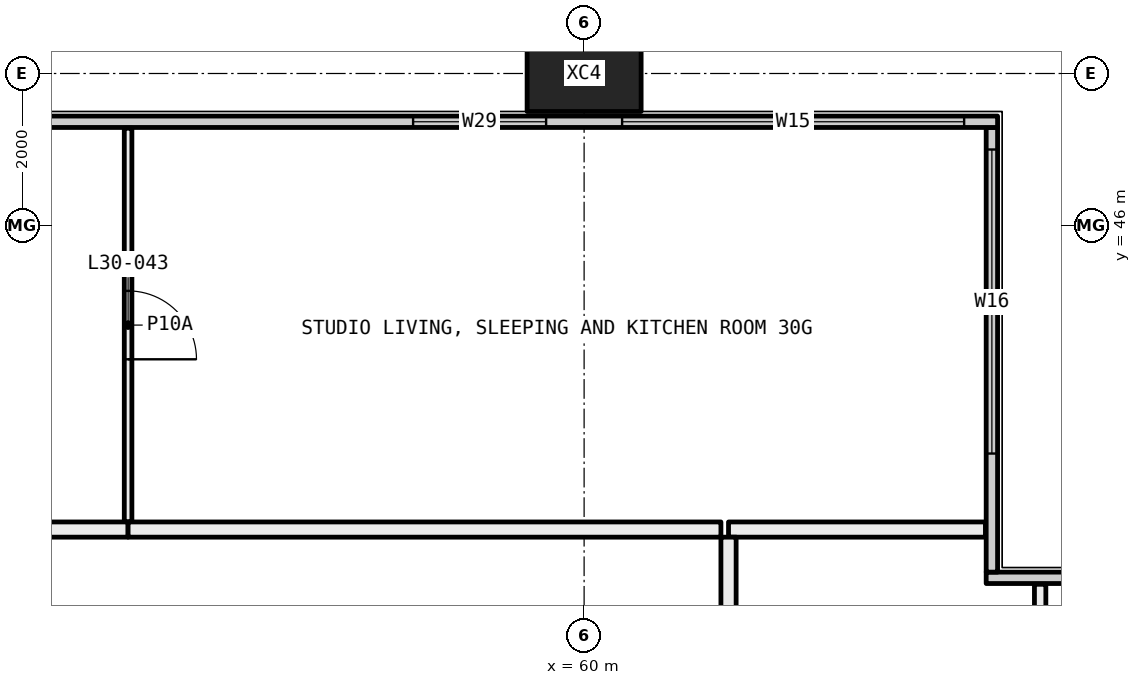
"""IFC4 building model, lengths in metres.
Left out: names, types, materials, properties, quantities, classifications, styles, units other than length and angle.
Written with IfcOpenShell. Run it as: python <this file> out.ifc"""

import sys

from ifc_helpers import new_model, si_unit, direction, frame, frame_2d, origin, origin_2d, place, context, subcontext, project, spatial, rectangle, hollow_rectangle, extrude, element, fill, save


model = new_model("IFC4")
c1 = context("Model", 3, precision=1e-05, world=origin(), true_north=direction((0.0, 1.0)))
c2 = subcontext(c1, "Body", "Model", "MODEL_VIEW")
j1 = project(units=[si_unit("LENGTHUNIT", "METRE"), si_unit("PLANEANGLEUNIT", "RADIAN")], contexts=[c1])
p1 = place(None, origin())
s1 = spatial("IfcSite", under=j1, at=p1, CompositionType="ELEMENT")
p2 = place(p1, origin())
s2 = spatial("IfcBuilding", under=s1, at=p2, CompositionType="ELEMENT")
p3 = place(p2, frame((0.0, 0.0, 117.3)))
s3 = spatial("IfcBuildingStorey", under=s2, at=p3, CompositionType="ELEMENT", Elevation=117.3)
p4 = place(p3, frame((60.0, 48.0, -0.4), z_axis=(0.0, 0.0, 1.0), x_axis=(1.0, 0.0, 0.0)))
e1 = element("IfcColumn", 1, at=p4, inside=s3, PredefinedType="COLUMN", context=c2, shape_type="SweptSolid", body=[
    extrude(hollow_rectangle(XDim=1.5, YDim=1.0, WallThickness=0.06, at=origin_2d()), origin(), (0.0, 0.0, 1.0), 3.45),
])
p5 = place(p3, frame((65.29, 41.365, 0.0), z_axis=(0.0, 0.0, 1.0), x_axis=(1.0, 0.0, 0.0)))
e2 = element("IfcWall", 2, at=p5, inside=s3, PredefinedType="ELEMENTEDWALL", context=c2, shape_type="SweptSolid", body=[
    extrude(rectangle(XDim=6.15, YDim=0.15, at=frame_2d((3.075, 0.0))), origin(), (0.0, 0.0, 1.0), 3.05),
])
p6 = place(p5, frame((1.71, 0.0, 0.45)))
e3 = element("IfcOpeningElement", 3, at=p6, cuts=e2, PredefinedType="OPENING", context=c2, shape_type="SweptSolid", body=[
    extrude(rectangle(XDim=4.0, YDim=2.55, at=frame_2d((2.0, 1.275))), frame((0.0, 0.085, 0.0), z_axis=(0.0, -1.0, 0.0), x_axis=(1.0, 0.0, 0.0)), (0.0, 0.0, 1.0), 0.17),
])
p7 = place(p3, frame((65.365, 41.44, 0.0), z_axis=(0.0, 0.0, 1.0), x_axis=(0.0, 1.0, 0.0)))
e4 = element("IfcWall", 4, at=p7, inside=s3, PredefinedType="ELEMENTEDWALL", context=c2, shape_type="SweptSolid", body=[
    extrude(rectangle(XDim=5.85, YDim=0.15, at=frame_2d((2.925, 0.0))), origin(), (0.0, 0.0, 1.0), 3.05),
])
p8 = place(p7, frame((1.56, 0.0, 0.45)))
e5 = element("IfcOpeningElement", 5, at=p8, cuts=e4, PredefinedType="OPENING", context=c2, shape_type="SweptSolid", body=[
    extrude(rectangle(XDim=4.0, YDim=2.55, at=frame_2d((2.0, 1.275))), frame((0.0, 0.085, 0.0), z_axis=(0.0, -1.0, 0.0), x_axis=(1.0, 0.0, 0.0)), (0.0, 0.0, 1.0), 0.17),
])
p9 = place(p3, frame((6.56, 47.365, 0.0), z_axis=(0.0, 0.0, 1.0), x_axis=(1.0, 0.0, 0.0)))
e6 = element("IfcWall", 6, at=p9, inside=s3, PredefinedType="ELEMENTEDWALL", context=c2, shape_type="SweptSolid", body=[
    extrude(rectangle(XDim=58.88, YDim=0.15, at=frame_2d((29.44, 0.0))), origin(), (0.0, 0.0, 1.0), 3.05),
])
p10 = place(p9, frame((0.44, 0.0, 0.45)))
e7 = element("IfcOpeningElement", 7, at=p10, cuts=e6, PredefinedType="OPENING", context=c2, shape_type="SweptSolid", body=[
    extrude(rectangle(XDim=4.5, YDim=2.55, at=frame_2d((2.25, 1.275))), frame((0.0, 0.085, 0.0), z_axis=(0.0, -1.0, 0.0), x_axis=(1.0, 0.0, 0.0)), (0.0, 0.0, 1.0), 0.17),
])
p11 = place(p9, frame((5.94, 0.0, 0.45)))
e8 = element("IfcOpeningElement", 8, at=p11, cuts=e6, PredefinedType="OPENING", context=c2, shape_type="SweptSolid", body=[
    extrude(rectangle(XDim=1.75, YDim=2.55, at=frame_2d((0.875, 1.275))), frame((0.0, 0.085, 0.0), z_axis=(0.0, -1.0, 0.0), x_axis=(1.0, 0.0, 0.0)), (0.0, 0.0, 1.0), 0.17),
])
p12 = place(p9, frame((15.19, 0.0, 0.45)))
e9 = element("IfcOpeningElement", 9, at=p12, cuts=e6, PredefinedType="OPENING", context=c2, shape_type="SweptSolid", body=[
    extrude(rectangle(XDim=1.75, YDim=2.55, at=frame_2d((0.875, 1.275))), frame((0.0, 0.085, 0.0), z_axis=(0.0, -1.0, 0.0), x_axis=(1.0, 0.0, 0.0)), (0.0, 0.0, 1.0), 0.17),
])
p13 = place(p9, frame((17.94, 0.0, 0.45)))
e10 = element("IfcOpeningElement", 10, at=p13, cuts=e6, PredefinedType="OPENING", context=c2, shape_type="SweptSolid", body=[
    extrude(rectangle(XDim=1.75, YDim=2.55, at=frame_2d((0.875, 1.275))), frame((0.0, 0.085, 0.0), z_axis=(0.0, -1.0, 0.0), x_axis=(1.0, 0.0, 0.0)), (0.0, 0.0, 1.0), 0.17),
])
p14 = place(p9, frame((27.19, 0.0, 0.45)))
e11 = element("IfcOpeningElement", 11, at=p14, cuts=e6, PredefinedType="OPENING", context=c2, shape_type="SweptSolid", body=[
    extrude(rectangle(XDim=1.75, YDim=2.55, at=frame_2d((0.875, 1.275))), frame((0.0, 0.085, 0.0), z_axis=(0.0, -1.0, 0.0), x_axis=(1.0, 0.0, 0.0)), (0.0, 0.0, 1.0), 0.17),
])
p15 = place(p9, frame((29.94, 0.0, 0.45)))
e12 = element("IfcOpeningElement", 12, at=p15, cuts=e6, PredefinedType="OPENING", context=c2, shape_type="SweptSolid", body=[
    extrude(rectangle(XDim=1.75, YDim=2.55, at=frame_2d((0.875, 1.275))), frame((0.0, 0.085, 0.0), z_axis=(0.0, -1.0, 0.0), x_axis=(1.0, 0.0, 0.0)), (0.0, 0.0, 1.0), 0.17),
])
p16 = place(p9, frame((39.19, 0.0, 0.45)))
e13 = element("IfcOpeningElement", 13, at=p16, cuts=e6, PredefinedType="OPENING", context=c2, shape_type="SweptSolid", body=[
    extrude(rectangle(XDim=1.75, YDim=2.55, at=frame_2d((0.875, 1.275))), frame((0.0, 0.085, 0.0), z_axis=(0.0, -1.0, 0.0), x_axis=(1.0, 0.0, 0.0)), (0.0, 0.0, 1.0), 0.17),
])
p17 = place(p9, frame((41.94, 0.0, 0.45)))
e14 = element("IfcOpeningElement", 14, at=p17, cuts=e6, PredefinedType="OPENING", context=c2, shape_type="SweptSolid", body=[
    extrude(rectangle(XDim=1.75, YDim=2.55, at=frame_2d((0.875, 1.275))), frame((0.0, 0.085, 0.0), z_axis=(0.0, -1.0, 0.0), x_axis=(1.0, 0.0, 0.0)), (0.0, 0.0, 1.0), 0.17),
])
p18 = place(p9, frame((51.19, 0.0, 0.45)))
e15 = element("IfcOpeningElement", 15, at=p18, cuts=e6, PredefinedType="OPENING", context=c2, shape_type="SweptSolid", body=[
    extrude(rectangle(XDim=1.75, YDim=2.55, at=frame_2d((0.875, 1.275))), frame((0.0, 0.085, 0.0), z_axis=(0.0, -1.0, 0.0), x_axis=(1.0, 0.0, 0.0)), (0.0, 0.0, 1.0), 0.17),
])
p19 = place(p9, frame((53.94, 0.0, 0.45)))
e16 = element("IfcOpeningElement", 16, at=p19, cuts=e6, PredefinedType="OPENING", context=c2, shape_type="SweptSolid", body=[
    extrude(rectangle(XDim=4.5, YDim=2.55, at=frame_2d((2.25, 1.275))), frame((0.0, 0.085, 0.0), z_axis=(0.0, -1.0, 0.0), x_axis=(1.0, 0.0, 0.0)), (0.0, 0.0, 1.0), 0.17),
])
p20 = place(p3, frame((66.0, 41.28, 0.0), z_axis=(0.0, 0.0, 1.0), x_axis=(0.0, -1.0, 0.0)))
e17 = element("IfcWall", 17, at=p20, inside=s3, PredefinedType="PARTITIONING", context=c2, shape_type="SweptSolid", body=[
    extrude(rectangle(XDim=3.78, YDim=0.15, at=frame_2d((1.89, 0.0))), origin(), (0.0, 0.0, 1.0), 3.05),
])
p21 = place(p3, frame((65.28, 42.0, 0.0), z_axis=(0.0, 0.0, 1.0), x_axis=(-1.0, 0.0, 0.0)))
e18 = element("IfcWall", 18, at=p21, inside=s3, PredefinedType="PARTITIONING", context=c2, shape_type="SweptSolid", body=[
    extrude(rectangle(XDim=3.38, YDim=0.2, at=frame_2d((1.69, 0.0))), origin(), (0.0, 0.0, 1.0), 3.05),
])
p22 = place(p3, frame((61.9, 41.9, 0.0), z_axis=(0.0, 0.0, 1.0), x_axis=(0.0, -1.0, 0.0)))
e19 = element("IfcWall", 19, at=p22, inside=s3, PredefinedType="PARTITIONING", context=c2, shape_type="SweptSolid", body=[
    extrude(rectangle(XDim=4.4, YDim=0.2, at=frame_2d((2.2, 0.0))), origin(), (0.0, 0.0, 1.0), 3.05),
])
p23 = place(p3, frame((54.0, 42.1, 0.0), z_axis=(0.0, 0.0, 1.0), x_axis=(0.0, 1.0, 0.0)))
e20 = element("IfcWall", 20, at=p23, inside=s3, PredefinedType="PARTITIONING", context=c2, shape_type="SweptSolid", body=[
    extrude(rectangle(XDim=5.18, YDim=0.1, at=frame_2d((2.59, 0.0))), origin(), (0.0, 0.0, 1.0), 3.05),
])
p24 = place(p23, frame((2.14, 0.0, 0.0)))
e21 = element("IfcOpeningElement", 21, at=p24, cuts=e20, PredefinedType="OPENING", context=c2, shape_type="SweptSolid", body=[
    extrude(rectangle(XDim=0.9, YDim=2.1, at=frame_2d((0.45, 1.05))), frame((0.0, 0.06, 0.0), z_axis=(0.0, -1.0, 0.0), x_axis=(1.0, 0.0, 0.0)), (0.0, 0.0, 1.0), 0.12),
])
p25 = place(p3, frame((48.0, 42.0, 0.0), z_axis=(0.0, 0.0, 1.0), x_axis=(1.0, 0.0, 0.0)))
e22 = element("IfcWall", 22, at=p25, inside=s3, PredefinedType="PARTITIONING", context=c2, shape_type="SweptSolid", body=[
    extrude(rectangle(XDim=6.0, YDim=0.2, at=frame_2d((3.0, 0.0))), origin(), (0.0, 0.0, 1.0), 3.05),
])
p26 = place(p25, frame((2.5, 0.0, 0.0)))
e23 = element("IfcOpeningElement", 23, at=p26, cuts=e22, PredefinedType="OPENING", context=c2, shape_type="SweptSolid", body=[
    extrude(rectangle(XDim=1.0, YDim=2.1, at=frame_2d((0.5, 1.05))), frame((0.0, 0.11, 0.0), z_axis=(0.0, -1.0, 0.0), x_axis=(1.0, 0.0, 0.0)), (0.0, 0.0, 1.0), 0.22),
])
p27 = place(p3, frame((54.0, 42.0, 0.0), z_axis=(0.0, 0.0, 1.0), x_axis=(1.0, 0.0, 0.0)))
e24 = element("IfcWall", 24, at=p27, inside=s3, PredefinedType="PARTITIONING", context=c2, shape_type="SweptSolid", body=[
    extrude(rectangle(XDim=7.8, YDim=0.2, at=frame_2d((3.9, 0.0))), origin(), (0.0, 0.0, 1.0), 3.05),
])
p28 = place(p8, origin())
e25 = element("IfcWindow", 25, at=p28, inside=s3, PartitioningType="SINGLE_PANEL", PredefinedType="WINDOW", context=c2, shape_type="SweptSolid", body=[
    extrude(rectangle(XDim=4.0, YDim=2.55, at=frame_2d((2.0, 1.275))), frame((0.0, 0.03, 0.0), z_axis=(0.0, -1.0, 0.0), x_axis=(1.0, 0.0, 0.0)), (0.0, 0.0, 1.0), 0.06),
])
fill(e5, e25)
p29 = place(p18, origin())
e26 = element("IfcWindow", 26, at=p29, inside=s3, PartitioningType="SINGLE_PANEL", PredefinedType="WINDOW", context=c2, shape_type="SweptSolid", body=[
    extrude(rectangle(XDim=1.75, YDim=2.55, at=frame_2d((0.875, 1.275))), frame((0.0, 0.03, 0.0), z_axis=(0.0, -1.0, 0.0), x_axis=(1.0, 0.0, 0.0)), (0.0, 0.0, 1.0), 0.06),
])
fill(e15, e26)
p30 = place(p19, origin())
e27 = element("IfcWindow", 27, at=p30, inside=s3, PartitioningType="SINGLE_PANEL", PredefinedType="WINDOW", context=c2, shape_type="SweptSolid", body=[
    extrude(rectangle(XDim=4.5, YDim=2.55, at=frame_2d((2.25, 1.275))), frame((0.0, 0.03, 0.0), z_axis=(0.0, -1.0, 0.0), x_axis=(1.0, 0.0, 0.0)), (0.0, 0.0, 1.0), 0.06),
])
fill(e16, e27)
p31 = place(p24, frame((0.9, 0.0, 0.0), x_axis=(-1.0, 0.0, 0.0)))
e28 = element("IfcDoor", 28, at=p31, inside=s3, OperationType="SINGLE_SWING_LEFT", PredefinedType="DOOR", context=c2, shape_type="SweptSolid", body=[
    extrude(rectangle(XDim=0.9, YDim=2.1, at=frame_2d((0.45, 1.05))), frame((0.0, 0.025, 0.0), z_axis=(0.0, -1.0, 0.0), x_axis=(1.0, 0.0, 0.0)), (0.0, 0.0, 1.0), 0.05),
])
fill(e21, e28)
save(model, sys.argv[1])
